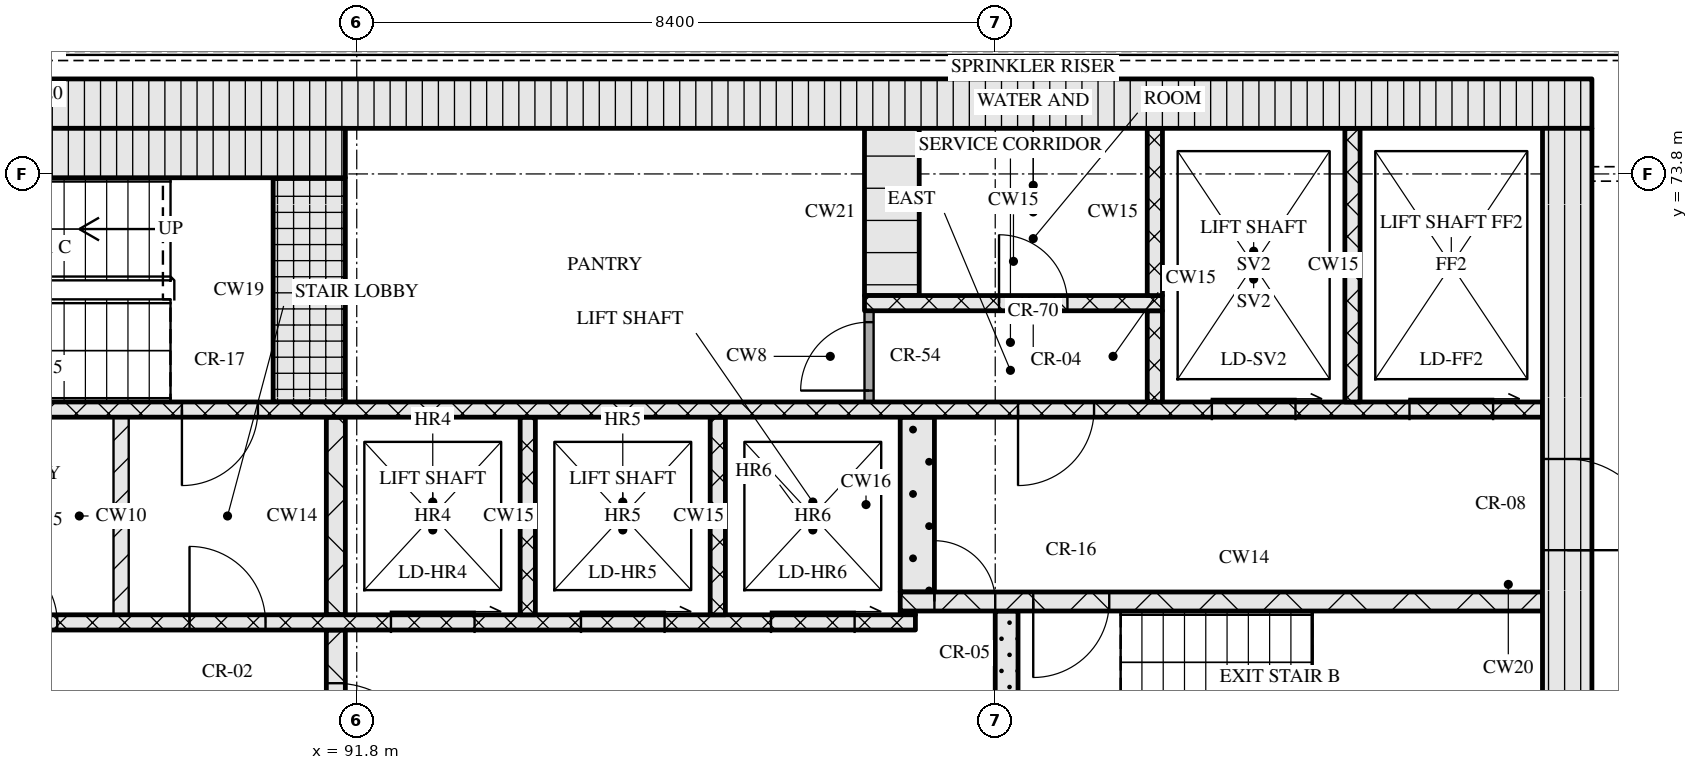
"""IFC4 building model, lengths in metres.
Left out: names, types, materials, properties, quantities, classifications, styles, units other than length and angle.
Written with IfcOpenShell. Run it as: python <this file> out.ifc"""

import sys

from ifc_helpers import new_model, si_unit, direction, frame, frame_2d, origin, place, context, subcontext, project, spatial, rectangle, extrude, element, fill, save


model = new_model("IFC4")
c1 = context("Model", 3, precision=1e-05, world=origin(), true_north=direction((0.0, 1.0)))
c2 = subcontext(c1, "Body", "Model", "MODEL_VIEW")
j1 = project(units=[si_unit("LENGTHUNIT", "METRE"), si_unit("PLANEANGLEUNIT", "RADIAN")], contexts=[c1])
p1 = place(None, origin())
s1 = spatial("IfcSite", under=j1, at=p1, CompositionType="ELEMENT")
p2 = place(p1, origin())
s2 = spatial("IfcBuilding", under=s1, at=p2, CompositionType="ELEMENT")
p3 = place(p2, frame((0.0, 0.0, 241.5)))
s3 = spatial("IfcBuildingStorey", under=s2, at=p3, CompositionType="ELEMENT", Elevation=241.5)
p4 = place(p3, frame((67.15, 74.725, 0.0), z_axis=(0.0, 0.0, 1.0), x_axis=(1.0, 0.0, 0.0)))
e1 = element("IfcWall", 1, at=p4, inside=s3, PredefinedType="SOLIDWALL", context=c2, shape_type="SweptSolid", body=[
    extrude(rectangle(XDim=40.9, YDim=0.65, at=frame_2d((20.45, 0.0))), origin(), (0.0, 0.0, 1.0), 3.32),
])
p5 = place(p3, frame((107.725, 62.4, 0.0), z_axis=(0.0, 0.0, 1.0), x_axis=(0.0, 1.0, 0.0)))
e2 = element("IfcWall", 2, at=p5, inside=s3, PredefinedType="SOLIDWALL", context=c2, shape_type="SweptSolid", body=[
    extrude(rectangle(XDim=12.0, YDim=0.65, at=frame_2d((6.0, 0.0))), origin(), (0.0, 0.0, 1.0), 3.32),
])
p6 = place(p5, frame((6.45, 0.0, 0.0)))
e3 = element("IfcOpeningElement", 3, at=p6, cuts=e2, PredefinedType="OPENING", context=c2, shape_type="SweptSolid", body=[
    extrude(rectangle(XDim=1.2, YDim=2.1, at=frame_2d((0.6, 1.05))), frame((0.0, 0.335, 0.0), z_axis=(0.0, -1.0, 0.0), x_axis=(1.0, 0.0, 0.0)), (0.0, 0.0, 1.0), 0.67),
])
p7 = place(p3, frame((91.525, 65.2, 0.0), z_axis=(0.0, 0.0, 1.0), x_axis=(0.0, 1.0, 0.0)))
e4 = element("IfcWall", 4, at=p7, inside=s3, PredefinedType="SOLIDWALL", context=c2, shape_type="SweptSolid", body=[
    extrude(rectangle(XDim=2.6, YDim=0.25, at=frame_2d((1.3, 0.0))), origin(), (0.0, 0.0, 1.0), 3.32),
])
p8 = place(p7, frame((0.7, 0.0, 0.0)))
e5 = element("IfcOpeningElement", 5, at=p8, cuts=e4, PredefinedType="OPENING", context=c2, shape_type="SweptSolid", body=[
    extrude(rectangle(XDim=1.2, YDim=2.1, at=frame_2d((0.6, 1.05))), frame((0.0, 0.135, 0.0), z_axis=(0.0, -1.0, 0.0), x_axis=(1.0, 0.0, 0.0)), (0.0, 0.0, 1.0), 0.27),
])
p9 = place(p3, frame((100.35, 65.2, 0.0), z_axis=(0.0, 0.0, 1.0), x_axis=(0.0, 1.0, 0.0)))
e6 = element("IfcWall", 6, at=p9, inside=s3, PredefinedType="SOLIDWALL", context=c2, shape_type="SweptSolid", body=[
    extrude(rectangle(XDim=2.85, YDim=0.3, at=frame_2d((1.425, 0.0))), origin(), (0.0, 0.0, 1.0), 3.32),
])
p10 = place(p3, frame((76.05, 67.9, 0.0), z_axis=(0.0, 0.0, 1.0), x_axis=(1.0, 0.0, 0.0)))
e7 = element("IfcWall", 7, at=p10, inside=s3, PredefinedType="SOLIDWALL", context=c2, shape_type="SweptSolid", body=[
    extrude(rectangle(XDim=23.1, YDim=0.2, at=frame_2d((11.55, 0.0))), origin(), (0.0, 0.0, 1.0), 3.32),
])
p11 = place(p10, frame((0.75, 0.0, 0.0)))
e8 = element("IfcOpeningElement", 8, at=p11, cuts=e7, PredefinedType="OPENING", context=c2, shape_type="SweptSolid", body=[
    extrude(rectangle(XDim=0.9, YDim=2.1, at=frame_2d((0.45, 1.05))), frame((0.0, 0.11, 0.0), z_axis=(0.0, -1.0, 0.0), x_axis=(1.0, 0.0, 0.0)), (0.0, 0.0, 1.0), 0.22),
])
p12 = place(p10, frame((3.32, 0.0, 0.0)))
e9 = element("IfcOpeningElement", 9, at=p12, cuts=e7, PredefinedType="OPENING", context=c2, shape_type="SweptSolid", body=[
    extrude(rectangle(XDim=0.9, YDim=2.1, at=frame_2d((0.45, 1.05))), frame((0.0, 0.11, 0.0), z_axis=(0.0, -1.0, 0.0), x_axis=(1.0, 0.0, 0.0)), (0.0, 0.0, 1.0), 0.22),
])
p13 = place(p10, frame((5.77, 0.0, 0.0)))
e10 = element("IfcOpeningElement", 10, at=p13, cuts=e7, PredefinedType="OPENING", context=c2, shape_type="SweptSolid", body=[
    extrude(rectangle(XDim=0.9, YDim=2.1, at=frame_2d((0.45, 1.05))), frame((0.0, 0.11, 0.0), z_axis=(0.0, -1.0, 0.0), x_axis=(1.0, 0.0, 0.0)), (0.0, 0.0, 1.0), 0.22),
])
p14 = place(p10, frame((8.45, 0.0, 0.0)))
e11 = element("IfcOpeningElement", 11, at=p14, cuts=e7, PredefinedType="OPENING", context=c2, shape_type="SweptSolid", body=[
    extrude(rectangle(XDim=0.9, YDim=2.1, at=frame_2d((0.45, 1.05))), frame((0.0, 0.11, 0.0), z_axis=(0.0, -1.0, 0.0), x_axis=(1.0, 0.0, 0.0)), (0.0, 0.0, 1.0), 0.22),
])
p15 = place(p10, frame((10.91, 0.0, 0.0)))
e12 = element("IfcOpeningElement", 12, at=p15, cuts=e7, PredefinedType="OPENING", context=c2, shape_type="SweptSolid", body=[
    extrude(rectangle(XDim=0.9, YDim=2.1, at=frame_2d((0.45, 1.05))), frame((0.0, 0.11, 0.0), z_axis=(0.0, -1.0, 0.0), x_axis=(1.0, 0.0, 0.0)), (0.0, 0.0, 1.0), 0.22),
])
p16 = place(p10, frame((13.55, 0.0, 0.0)))
e13 = element("IfcOpeningElement", 13, at=p16, cuts=e7, PredefinedType="OPENING", context=c2, shape_type="SweptSolid", body=[
    extrude(rectangle(XDim=1.0, YDim=2.1, at=frame_2d((0.5, 1.05))), frame((0.0, 0.11, 0.0), z_axis=(0.0, -1.0, 0.0), x_axis=(1.0, 0.0, 0.0)), (0.0, 0.0, 1.0), 0.22),
])
p17 = place(p10, frame((16.2, 0.0, 0.0)))
e14 = element("IfcOpeningElement", 14, at=p17, cuts=e7, PredefinedType="OPENING", context=c2, shape_type="SweptSolid", body=[
    extrude(rectangle(XDim=1.1, YDim=2.1, at=frame_2d((0.55, 1.05))), frame((0.0, 0.11, 0.0), z_axis=(0.0, -1.0, 0.0), x_axis=(1.0, 0.0, 0.0)), (0.0, 0.0, 1.0), 0.22),
])
p18 = place(p10, frame((18.7, 0.0, 0.0)))
e15 = element("IfcOpeningElement", 15, at=p18, cuts=e7, PredefinedType="OPENING", context=c2, shape_type="SweptSolid", body=[
    extrude(rectangle(XDim=1.1, YDim=2.1, at=frame_2d((0.55, 1.05))), frame((0.0, 0.11, 0.0), z_axis=(0.0, -1.0, 0.0), x_axis=(1.0, 0.0, 0.0)), (0.0, 0.0, 1.0), 0.22),
])
p19 = place(p10, frame((21.2, 0.0, 0.0)))
e16 = element("IfcOpeningElement", 16, at=p19, cuts=e7, PredefinedType="OPENING", context=c2, shape_type="SweptSolid", body=[
    extrude(rectangle(XDim=1.1, YDim=2.1, at=frame_2d((0.55, 1.05))), frame((0.0, 0.11, 0.0), z_axis=(0.0, -1.0, 0.0), x_axis=(1.0, 0.0, 0.0)), (0.0, 0.0, 1.0), 0.22),
])
p20 = place(p3, frame((88.7, 68.0, 0.0), z_axis=(0.0, 0.0, 1.0), x_axis=(0.0, 1.0, 0.0)))
e17 = element("IfcWall", 17, at=p20, inside=s3, PredefinedType="PARTITIONING", context=c2, shape_type="SweptSolid", body=[
    extrude(rectangle(XDim=2.6, YDim=0.2, at=frame_2d((1.3, 0.0))), origin(), (0.0, 0.0, 1.0), 3.32),
])
p21 = place(p3, frame((91.525, 68.0, 0.0), z_axis=(0.0, 0.0, 1.0), x_axis=(0.0, 1.0, 0.0)))
e18 = element("IfcWall", 18, at=p21, inside=s3, PredefinedType="SOLIDWALL", context=c2, shape_type="SweptSolid", body=[
    extrude(rectangle(XDim=2.6, YDim=0.25, at=frame_2d((1.3, 0.0))), origin(), (0.0, 0.0, 1.0), 3.32),
])
for number, where, z_axis, x_axis in (
    (19, (94.05, 68.0, 0.0), (0.0, 0.0, 1.0), (0.0, 1.0, 0.0)),
    (20, (96.55, 68.0, 0.0), (0.0, 0.0, 1.0), (0.0, 1.0, 0.0)),
):
    element("IfcWall", number, at=place(p3, frame(where, z_axis=z_axis, x_axis=x_axis)), inside=s3, PredefinedType="SOLIDWALL", context=c2, shape_type="SweptSolid", body=[
        extrude(rectangle(XDim=2.6, YDim=0.2, at=frame_2d((1.3, 0.0))), origin(), (0.0, 0.0, 1.0), 3.32),
    ])
p22 = place(p3, frame((98.95, 68.025, 0.0), z_axis=(0.0, 0.0, 1.0), x_axis=(1.0, 0.0, 0.0)))
e21 = element("IfcWall", 21, at=p22, inside=s3, PredefinedType="SOLIDWALL", context=c2, shape_type="SweptSolid", body=[
    extrude(rectangle(XDim=0.2, YDim=0.05, at=frame_2d((0.1, 0.0))), origin(), (0.0, 0.0, 1.0), 3.32),
])
p23 = place(p3, frame((98.95, 68.175, 0.0), z_axis=(0.0, 0.0, 1.0), x_axis=(1.0, 0.0, 0.0)))
e22 = element("IfcWall", 22, at=p23, inside=s3, PredefinedType="SOLIDWALL", context=c2, shape_type="SweptSolid", body=[
    extrude(rectangle(XDim=8.45, YDim=0.25, at=frame_2d((4.225, 0.0))), origin(), (0.0, 0.0, 1.0), 3.32),
])
p24 = place(p23, frame((0.45, 0.0, 0.0)))
e23 = element("IfcOpeningElement", 23, at=p24, cuts=e22, PredefinedType="OPENING", context=c2, shape_type="SweptSolid", body=[
    extrude(rectangle(XDim=0.8, YDim=2.1, at=frame_2d((0.4, 1.05))), frame((0.0, 0.135, 0.0), z_axis=(0.0, -1.0, 0.0), x_axis=(1.0, 0.0, 0.0)), (0.0, 0.0, 1.0), 0.27),
])
p25 = place(p23, frame((1.75, 0.0, 0.0)))
e24 = element("IfcOpeningElement", 24, at=p25, cuts=e22, PredefinedType="OPENING", context=c2, shape_type="SweptSolid", body=[
    extrude(rectangle(XDim=1.0, YDim=2.1, at=frame_2d((0.5, 1.05))), frame((0.0, 0.135, 0.0), z_axis=(0.0, -1.0, 0.0), x_axis=(1.0, 0.0, 0.0)), (0.0, 0.0, 1.0), 0.27),
])
p26 = place(p3, frame((99.175, 68.3, 0.0), z_axis=(0.0, 0.0, 1.0), x_axis=(0.0, 1.0, 0.0)))
e25 = element("IfcWall", 25, at=p26, inside=s3, PredefinedType="SOLIDWALL", context=c2, shape_type="SweptSolid", body=[
    extrude(rectangle(XDim=2.3, YDim=0.45, at=frame_2d((1.15, 0.0))), origin(), (0.0, 0.0, 1.0), 3.32),
])
p27 = place(p3, frame((67.8, 70.7, 0.0), z_axis=(0.0, 0.0, 1.0), x_axis=(1.0, 0.0, 0.0)))
e26 = element("IfcWall", 26, at=p27, inside=s3, PredefinedType="SOLIDWALL", context=c2, shape_type="SweptSolid", body=[
    extrude(rectangle(XDim=39.6, YDim=0.2, at=frame_2d((19.8, 0.0))), origin(), (0.0, 0.0, 1.0), 3.32),
])
p28 = place(p27, frame((0.65, 0.0, 0.0)))
e27 = element("IfcOpeningElement", 27, at=p28, cuts=e26, PredefinedType="OPENING", context=c2, shape_type="SweptSolid", body=[
    extrude(rectangle(XDim=1.1, YDim=2.1, at=frame_2d((0.55, 1.05))), frame((0.0, 0.11, 0.0), z_axis=(0.0, -1.0, 0.0), x_axis=(1.0, 0.0, 0.0)), (0.0, 0.0, 1.0), 0.22),
])
p29 = place(p27, frame((3.25, 0.0, 0.0)))
e28 = element("IfcOpeningElement", 28, at=p29, cuts=e26, PredefinedType="OPENING", context=c2, shape_type="SweptSolid", body=[
    extrude(rectangle(XDim=1.1, YDim=2.1, at=frame_2d((0.55, 1.05))), frame((0.0, 0.11, 0.0), z_axis=(0.0, -1.0, 0.0), x_axis=(1.0, 0.0, 0.0)), (0.0, 0.0, 1.0), 0.22),
])
p30 = place(p27, frame((5.9, 0.0, 0.0)))
e29 = element("IfcOpeningElement", 29, at=p30, cuts=e26, PredefinedType="OPENING", context=c2, shape_type="SweptSolid", body=[
    extrude(rectangle(XDim=1.0, YDim=2.1, at=frame_2d((0.5, 1.05))), frame((0.0, 0.11, 0.0), z_axis=(0.0, -1.0, 0.0), x_axis=(1.0, 0.0, 0.0)), (0.0, 0.0, 1.0), 0.22),
])
p31 = place(p27, frame((21.7, 0.0, 0.0)))
e30 = element("IfcOpeningElement", 30, at=p31, cuts=e26, PredefinedType="OPENING", context=c2, shape_type="SweptSolid", body=[
    extrude(rectangle(XDim=1.0, YDim=2.1, at=frame_2d((0.5, 1.05))), frame((0.0, 0.11, 0.0), z_axis=(0.0, -1.0, 0.0), x_axis=(1.0, 0.0, 0.0)), (0.0, 0.0, 1.0), 0.22),
])
p32 = place(p27, frame((32.7, 0.0, 0.0)))
e31 = element("IfcOpeningElement", 31, at=p32, cuts=e26, PredefinedType="OPENING", context=c2, shape_type="SweptSolid", body=[
    extrude(rectangle(XDim=1.0, YDim=2.1, at=frame_2d((0.5, 1.05))), frame((0.0, 0.11, 0.0), z_axis=(0.0, -1.0, 0.0), x_axis=(1.0, 0.0, 0.0)), (0.0, 0.0, 1.0), 0.22),
])
p33 = place(p27, frame((35.25, 0.0, 0.0)))
e32 = element("IfcOpeningElement", 32, at=p33, cuts=e26, PredefinedType="OPENING", context=c2, shape_type="SweptSolid", body=[
    extrude(rectangle(XDim=1.1, YDim=2.1, at=frame_2d((0.55, 1.05))), frame((0.0, 0.11, 0.0), z_axis=(0.0, -1.0, 0.0), x_axis=(1.0, 0.0, 0.0)), (0.0, 0.0, 1.0), 0.22),
])
p34 = place(p27, frame((37.85, 0.0, 0.0)))
e33 = element("IfcOpeningElement", 33, at=p34, cuts=e26, PredefinedType="OPENING", context=c2, shape_type="SweptSolid", body=[
    extrude(rectangle(XDim=1.1, YDim=2.1, at=frame_2d((0.55, 1.05))), frame((0.0, 0.11, 0.0), z_axis=(0.0, -1.0, 0.0), x_axis=(1.0, 0.0, 0.0)), (0.0, 0.0, 1.0), 0.22),
])
p35 = place(p3, frame((91.175, 70.8, 0.0), z_axis=(0.0, 0.0, 1.0), x_axis=(0.0, 1.0, 0.0)))
e34 = element("IfcWall", 34, at=p35, inside=s3, PredefinedType="SOLIDWALL", context=c2, shape_type="SweptSolid", body=[
    extrude(rectangle(XDim=2.95, YDim=0.95, at=frame_2d((1.475, 0.0))), origin(), (0.0, 0.0, 1.0), 3.32),
])
p36 = place(p3, frame((98.54, 70.8, 0.0), z_axis=(0.0, 0.0, 1.0), x_axis=(0.0, 1.0, 0.0)))
e35 = element("IfcWall", 35, at=p36, inside=s3, PredefinedType="PARTITIONING", context=c2, shape_type="SweptSolid", body=[
    extrude(rectangle(XDim=1.2, YDim=0.12, at=frame_2d((0.6, 0.0))), origin(), (0.0, 0.0, 1.0), 3.32),
])
p37 = place(p36, frame((0.15, 0.0, 0.0)))
e36 = element("IfcOpeningElement", 36, at=p37, cuts=e35, PredefinedType="OPENING", context=c2, shape_type="SweptSolid", body=[
    extrude(rectangle(XDim=0.9, YDim=2.1, at=frame_2d((0.45, 1.05))), frame((0.0, 0.07, 0.0), z_axis=(0.0, -1.0, 0.0), x_axis=(1.0, 0.0, 0.0)), (0.0, 0.0, 1.0), 0.14),
])
p38 = place(p3, frame((102.3, 70.8, 0.0), z_axis=(0.0, 0.0, 1.0), x_axis=(0.0, 1.0, 0.0)))
e37 = element("IfcWall", 37, at=p38, inside=s3, PredefinedType="SOLIDWALL", context=c2, shape_type="SweptSolid", body=[
    extrude(rectangle(XDim=1.2, YDim=0.2, at=frame_2d((0.6, 0.0))), origin(), (0.0, 0.0, 1.0), 3.32),
])
p39 = place(p3, frame((104.9, 70.8, 0.0), z_axis=(0.0, 0.0, 1.0), x_axis=(0.0, 1.0, 0.0)))
e38 = element("IfcWall", 38, at=p39, inside=s3, PredefinedType="SOLIDWALL", context=c2, shape_type="SweptSolid", body=[
    extrude(rectangle(XDim=3.6, YDim=0.2, at=frame_2d((1.8, 0.0))), origin(), (0.0, 0.0, 1.0), 3.32),
])
p40 = place(p3, frame((98.48, 72.1, 0.0), z_axis=(0.0, 0.0, 1.0), x_axis=(1.0, 0.0, 0.0)))
e39 = element("IfcWall", 39, at=p40, inside=s3, PredefinedType="SOLIDWALL", context=c2, shape_type="SweptSolid", body=[
    extrude(rectangle(XDim=3.92, YDim=0.2, at=frame_2d((1.96, 0.0))), origin(), (0.0, 0.0, 1.0), 3.32),
])
p41 = place(p40, frame((1.77, 0.0, 0.0)))
e40 = element("IfcOpeningElement", 40, at=p41, cuts=e39, PredefinedType="OPENING", context=c2, shape_type="SweptSolid", body=[
    extrude(rectangle(XDim=0.9, YDim=2.1, at=frame_2d((0.45, 1.05))), frame((0.0, 0.11, 0.0), z_axis=(0.0, -1.0, 0.0), x_axis=(1.0, 0.0, 0.0)), (0.0, 0.0, 1.0), 0.22),
])
p42 = place(p3, frame((98.84, 72.2, 0.0), z_axis=(0.0, 0.0, 1.0), x_axis=(0.0, 1.0, 0.0)))
e41 = element("IfcWall", 41, at=p42, inside=s3, PredefinedType="SOLIDWALL", context=c2, shape_type="SweptSolid", body=[
    extrude(rectangle(XDim=2.2, YDim=0.72, at=frame_2d((1.1, 0.0))), origin(), (0.0, 0.0, 1.0), 3.32),
])
p43 = place(p3, frame((102.3, 72.2, 0.0), z_axis=(0.0, 0.0, 1.0), x_axis=(0.0, 1.0, 0.0)))
e42 = element("IfcWall", 42, at=p43, inside=s3, PredefinedType="SOLIDWALL", context=c2, shape_type="SweptSolid", body=[
    extrude(rectangle(XDim=2.2, YDim=0.2, at=frame_2d((1.1, 0.0))), origin(), (0.0, 0.0, 1.0), 3.32),
])
p44 = place(p3, frame((83.55, 74.075, 0.0), z_axis=(0.0, 0.0, 1.0), x_axis=(1.0, 0.0, 0.0)))
e43 = element("IfcWall", 43, at=p44, inside=s3, PredefinedType="SOLIDWALL", context=c2, shape_type="SweptSolid", body=[
    extrude(rectangle(XDim=8.1, YDim=0.65, at=frame_2d((4.05, 0.0))), origin(), (0.0, 0.0, 1.0), 3.32),
])
p45 = place(p8, origin())
e44 = element("IfcDoor", 44, at=p45, inside=s3, OperationType="SINGLE_SWING_RIGHT", PredefinedType="DOOR", context=c2, shape_type="SweptSolid", body=[
    extrude(rectangle(XDim=1.2, YDim=2.1, at=frame_2d((0.6, 1.05))), frame((0.0, 0.025, 0.0), z_axis=(0.0, -1.0, 0.0), x_axis=(1.0, 0.0, 0.0)), (0.0, 0.0, 1.0), 0.05),
])
fill(e5, e44)
p46 = place(p15, origin())
e45 = element("IfcDoor", 45, at=p46, inside=s3, OperationType="SINGLE_SWING_LEFT", PredefinedType="DOOR", context=c2, shape_type="SweptSolid", body=[
    extrude(rectangle(XDim=0.9, YDim=2.1, at=frame_2d((0.45, 1.05))), frame((0.0, 0.025, 0.0), z_axis=(0.0, -1.0, 0.0), x_axis=(1.0, 0.0, 0.0)), (0.0, 0.0, 1.0), 0.05),
])
fill(e12, e45)
p47 = place(p16, origin())
e46 = element("IfcDoor", 46, at=p47, inside=s3, OperationType="SINGLE_SWING_LEFT", PredefinedType="DOOR", context=c2, shape_type="SweptSolid", body=[
    extrude(rectangle(XDim=1.0, YDim=2.1, at=frame_2d((0.5, 1.05))), frame((0.0, 0.025, 0.0), z_axis=(0.0, -1.0, 0.0), x_axis=(1.0, 0.0, 0.0)), (0.0, 0.0, 1.0), 0.05),
])
fill(e13, e46)
p48 = place(p17, origin())
e47 = element("IfcDoor", 47, at=p48, inside=s3, OperationType="SLIDING_TO_RIGHT", PredefinedType="DOOR", context=c2, shape_type="SweptSolid", body=[
    extrude(rectangle(XDim=1.1, YDim=2.1, at=frame_2d((0.55, 1.05))), frame((0.0, 0.025, 0.0), z_axis=(0.0, -1.0, 0.0), x_axis=(1.0, 0.0, 0.0)), (0.0, 0.0, 1.0), 0.05),
])
fill(e14, e47)
p49 = place(p18, origin())
e48 = element("IfcDoor", 48, at=p49, inside=s3, OperationType="SLIDING_TO_RIGHT", PredefinedType="DOOR", context=c2, shape_type="SweptSolid", body=[
    extrude(rectangle(XDim=1.1, YDim=2.1, at=frame_2d((0.55, 1.05))), frame((0.0, 0.025, 0.0), z_axis=(0.0, -1.0, 0.0), x_axis=(1.0, 0.0, 0.0)), (0.0, 0.0, 1.0), 0.05),
])
fill(e15, e48)
p50 = place(p19, origin())
e49 = element("IfcDoor", 49, at=p50, inside=s3, OperationType="SLIDING_TO_RIGHT", PredefinedType="DOOR", context=c2, shape_type="SweptSolid", body=[
    extrude(rectangle(XDim=1.1, YDim=2.1, at=frame_2d((0.55, 1.05))), frame((0.0, 0.025, 0.0), z_axis=(0.0, -1.0, 0.0), x_axis=(1.0, 0.0, 0.0)), (0.0, 0.0, 1.0), 0.05),
])
fill(e16, e49)
p51 = place(p24, origin())
e50 = element("IfcDoor", 50, at=p51, inside=s3, OperationType="SINGLE_SWING_LEFT", PredefinedType="DOOR", context=c2, shape_type="SweptSolid", body=[
    extrude(rectangle(XDim=0.8, YDim=2.1, at=frame_2d((0.4, 1.05))), frame((0.0, 0.025, 0.0), z_axis=(0.0, -1.0, 0.0), x_axis=(1.0, 0.0, 0.0)), (0.0, 0.0, 1.0), 0.05),
])
fill(e23, e50)
p52 = place(p25, origin())
e51 = element("IfcDoor", 51, at=p52, inside=s3, OperationType="SINGLE_SWING_RIGHT", PredefinedType="DOOR", context=c2, shape_type="SweptSolid", body=[
    extrude(rectangle(XDim=1.0, YDim=2.1, at=frame_2d((0.5, 1.05))), frame((0.0, 0.025, 0.0), z_axis=(0.0, -1.0, 0.0), x_axis=(1.0, 0.0, 0.0)), (0.0, 0.0, 1.0), 0.05),
])
fill(e24, e51)
p53 = place(p6, origin())
e52 = element("IfcDoor", 52, at=p53, inside=s3, OperationType="SINGLE_SWING_RIGHT", PredefinedType="DOOR", context=c2, shape_type="SweptSolid", body=[
    extrude(rectangle(XDim=1.2, YDim=2.1, at=frame_2d((0.6, 1.05))), frame((0.0, 0.025, 0.0), z_axis=(0.0, -1.0, 0.0), x_axis=(1.0, 0.0, 0.0)), (0.0, 0.0, 1.0), 0.05),
])
fill(e3, e52)
p54 = place(p31, origin())
e53 = element("IfcDoor", 53, at=p54, inside=s3, OperationType="SINGLE_SWING_RIGHT", PredefinedType="DOOR", context=c2, shape_type="SweptSolid", body=[
    extrude(rectangle(XDim=1.0, YDim=2.1, at=frame_2d((0.5, 1.05))), frame((0.0, 0.025, 0.0), z_axis=(0.0, -1.0, 0.0), x_axis=(1.0, 0.0, 0.0)), (0.0, 0.0, 1.0), 0.05),
])
fill(e30, e53)
p55 = place(p32, origin())
e54 = element("IfcDoor", 54, at=p55, inside=s3, OperationType="SINGLE_SWING_RIGHT", PredefinedType="DOOR", context=c2, shape_type="SweptSolid", body=[
    extrude(rectangle(XDim=1.0, YDim=2.1, at=frame_2d((0.5, 1.05))), frame((0.0, 0.025, 0.0), z_axis=(0.0, -1.0, 0.0), x_axis=(1.0, 0.0, 0.0)), (0.0, 0.0, 1.0), 0.05),
])
fill(e31, e54)
p56 = place(p33, origin())
e55 = element("IfcDoor", 55, at=p56, inside=s3, OperationType="SLIDING_TO_RIGHT", PredefinedType="DOOR", context=c2, shape_type="SweptSolid", body=[
    extrude(rectangle(XDim=1.1, YDim=2.1, at=frame_2d((0.55, 1.05))), frame((0.0, 0.025, 0.0), z_axis=(0.0, -1.0, 0.0), x_axis=(1.0, 0.0, 0.0)), (0.0, 0.0, 1.0), 0.05),
])
fill(e32, e55)
p57 = place(p34, origin())
e56 = element("IfcDoor", 56, at=p57, inside=s3, OperationType="SLIDING_TO_RIGHT", PredefinedType="DOOR", context=c2, shape_type="SweptSolid", body=[
    extrude(rectangle(XDim=1.1, YDim=2.1, at=frame_2d((0.55, 1.05))), frame((0.0, 0.025, 0.0), z_axis=(0.0, -1.0, 0.0), x_axis=(1.0, 0.0, 0.0)), (0.0, 0.0, 1.0), 0.05),
])
fill(e33, e56)
p58 = place(p37, origin())
e57 = element("IfcDoor", 57, at=p58, inside=s3, OperationType="SINGLE_SWING_LEFT", PredefinedType="DOOR", context=c2, shape_type="SweptSolid", body=[
    extrude(rectangle(XDim=0.9, YDim=2.1, at=frame_2d((0.45, 1.05))), frame((0.0, 0.025, 0.0), z_axis=(0.0, -1.0, 0.0), x_axis=(1.0, 0.0, 0.0)), (0.0, 0.0, 1.0), 0.05),
])
fill(e36, e57)
p59 = place(p41, origin())
e58 = element("IfcDoor", 58, at=p59, inside=s3, OperationType="SINGLE_SWING_LEFT", PredefinedType="DOOR", context=c2, shape_type="SweptSolid", body=[
    extrude(rectangle(XDim=0.9, YDim=2.1, at=frame_2d((0.45, 1.05))), frame((0.0, 0.025, 0.0), z_axis=(0.0, -1.0, 0.0), x_axis=(1.0, 0.0, 0.0)), (0.0, 0.0, 1.0), 0.05),
])
fill(e40, e58)
save(model, sys.argv[1])
